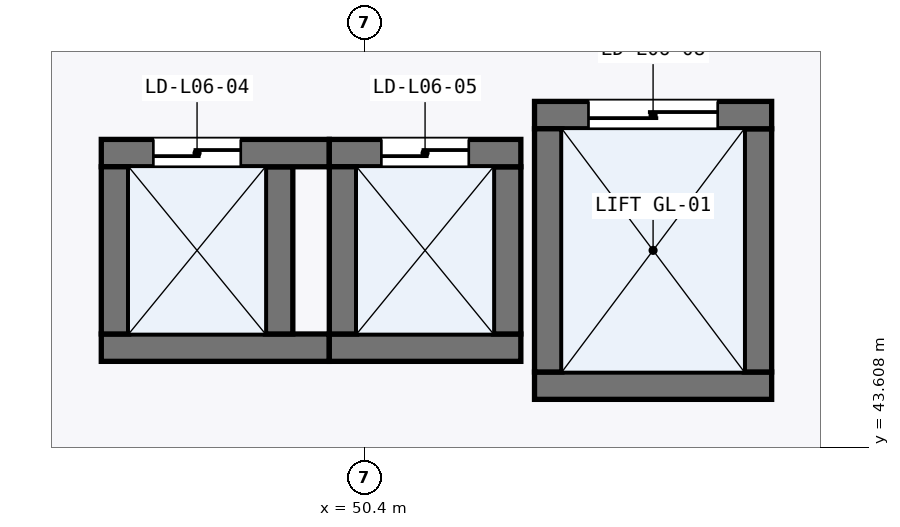
"""IFC4 building model, lengths in metres.
Left out: names, types, materials, properties, quantities, classifications, styles, units other than length and angle.
Written with IfcOpenShell. Run it as: python <this file> out.ifc"""

import sys

from ifc_helpers import new_model, si_unit, direction, frame, frame_2d, origin, place, context, subcontext, project, spatial, rectangle, extrude, element, fill, save


model = new_model("IFC4")
c1 = context("Model", 3, precision=1e-05, world=origin(), true_north=direction((0.0, 1.0)))
c2 = subcontext(c1, "Body", "Model", "MODEL_VIEW")
j1 = project(units=[si_unit("LENGTHUNIT", "METRE"), si_unit("PLANEANGLEUNIT", "RADIAN")], contexts=[c1])
p1 = place(None, origin())
s1 = spatial("IfcSite", under=j1, at=p1, CompositionType="ELEMENT")
p2 = place(p1, origin())
s2 = spatial("IfcBuilding", under=s1, at=p2, CompositionType="ELEMENT")
p3 = place(p2, frame((0.0, 0.0, 26.7)))
s3 = spatial("IfcBuildingStorey", under=s2, at=p3, CompositionType="ELEMENT", Elevation=26.7)
p4 = place(p3, frame((46.94, 44.92, 0.0), z_axis=(0.0, 0.0, 1.0), x_axis=(1.0, 0.0, 0.0)))
e1 = element("IfcWall", 1, at=p4, inside=s3, PredefinedType="SHEAR", context=c2, shape_type="SweptSolid", body=[
    extrude(rectangle(XDim=3.0, YDim=0.36, at=frame_2d((1.5, 0.0))), origin(), (0.0, 0.0, 1.0), 4.845),
])
p5 = place(p3, frame((49.28, 45.1, 0.0), z_axis=(0.0, 0.0, 1.0), x_axis=(0.0, 1.0, 0.0)))
e2 = element("IfcWall", 2, at=p5, inside=s3, PredefinedType="SHEAR", context=c2, shape_type="SweptSolid", body=[
    extrude(rectangle(XDim=2.2, YDim=0.36, at=frame_2d((1.1, 0.0))), origin(), (0.0, 0.0, 1.0), 4.845),
])
p6 = place(p3, frame((49.94, 47.48, 0.0), z_axis=(0.0, 0.0, 1.0), x_axis=(-1.0, 0.0, 0.0)))
e3 = element("IfcWall", 3, at=p6, inside=s3, PredefinedType="SHEAR", context=c2, shape_type="SweptSolid", body=[
    extrude(rectangle(XDim=3.0, YDim=0.36, at=frame_2d((1.5, 0.0))), origin(), (0.0, 0.0, 1.0), 4.845),
])
p7 = place(p6, frame((1.165, 0.0, 0.0)))
e4 = element("IfcOpeningElement", 4, at=p7, cuts=e3, PredefinedType="OPENING", context=c2, shape_type="SweptSolid", body=[
    extrude(rectangle(XDim=1.15, YDim=2.2, at=frame_2d((0.575, 1.1))), frame((0.0, 0.19, 0.0), z_axis=(0.0, -1.0, 0.0), x_axis=(1.0, 0.0, 0.0)), (0.0, 0.0, 1.0), 0.38),
])
p8 = place(p3, frame((47.12, 47.3, 0.0), z_axis=(0.0, 0.0, 1.0), x_axis=(0.0, -1.0, 0.0)))
e5 = element("IfcWall", 5, at=p8, inside=s3, PredefinedType="SHEAR", context=c2, shape_type="SweptSolid", body=[
    extrude(rectangle(XDim=2.2, YDim=0.36, at=frame_2d((1.1, 0.0))), origin(), (0.0, 0.0, 1.0), 4.845),
])
p9 = place(p3, frame((49.94, 44.92, 0.0), z_axis=(0.0, 0.0, 1.0), x_axis=(1.0, 0.0, 0.0)))
e6 = element("IfcWall", 6, at=p9, inside=s3, PredefinedType="SHEAR", context=c2, shape_type="SweptSolid", body=[
    extrude(rectangle(XDim=2.52, YDim=0.36, at=frame_2d((1.26, 0.0))), origin(), (0.0, 0.0, 1.0), 4.845),
])
p10 = place(p3, frame((52.28, 45.1, 0.0), z_axis=(0.0, 0.0, 1.0), x_axis=(0.0, 1.0, 0.0)))
e7 = element("IfcWall", 7, at=p10, inside=s3, PredefinedType="SHEAR", context=c2, shape_type="SweptSolid", body=[
    extrude(rectangle(XDim=2.2, YDim=0.36, at=frame_2d((1.1, 0.0))), origin(), (0.0, 0.0, 1.0), 4.845),
])
p11 = place(p3, frame((52.46, 47.48, 0.0), z_axis=(0.0, 0.0, 1.0), x_axis=(-1.0, 0.0, 0.0)))
e8 = element("IfcWall", 8, at=p11, inside=s3, PredefinedType="SHEAR", context=c2, shape_type="SweptSolid", body=[
    extrude(rectangle(XDim=2.52, YDim=0.36, at=frame_2d((1.26, 0.0))), origin(), (0.0, 0.0, 1.0), 4.845),
])
p12 = place(p11, frame((0.685, 0.0, 0.0)))
e9 = element("IfcOpeningElement", 9, at=p12, cuts=e8, PredefinedType="OPENING", context=c2, shape_type="SweptSolid", body=[
    extrude(rectangle(XDim=1.15, YDim=2.2, at=frame_2d((0.575, 1.1))), frame((0.0, 0.19, 0.0), z_axis=(0.0, -1.0, 0.0), x_axis=(1.0, 0.0, 0.0)), (0.0, 0.0, 1.0), 0.38),
])
p13 = place(p3, frame((50.12, 47.3, 0.0), z_axis=(0.0, 0.0, 1.0), x_axis=(0.0, -1.0, 0.0)))
e10 = element("IfcWall", 10, at=p13, inside=s3, PredefinedType="SHEAR", context=c2, shape_type="SweptSolid", body=[
    extrude(rectangle(XDim=2.2, YDim=0.36, at=frame_2d((1.1, 0.0))), origin(), (0.0, 0.0, 1.0), 4.845),
])
p14 = place(p3, frame((52.64, 44.42, 0.0), z_axis=(0.0, 0.0, 1.0), x_axis=(1.0, 0.0, 0.0)))
e11 = element("IfcWall", 11, at=p14, inside=s3, PredefinedType="SHEAR", context=c2, shape_type="SweptSolid", body=[
    extrude(rectangle(XDim=3.12, YDim=0.36, at=frame_2d((1.56, 0.0))), origin(), (0.0, 0.0, 1.0), 4.095),
])
p15 = place(p3, frame((55.58, 44.6, 0.0), z_axis=(0.0, 0.0, 1.0), x_axis=(0.0, 1.0, 0.0)))
e12 = element("IfcWall", 12, at=p15, inside=s3, PredefinedType="SHEAR", context=c2, shape_type="SweptSolid", body=[
    extrude(rectangle(XDim=3.2, YDim=0.36, at=frame_2d((1.6, 0.0))), origin(), (0.0, 0.0, 1.0), 4.095),
])
p16 = place(p3, frame((55.76, 47.98, 0.0), z_axis=(0.0, 0.0, 1.0), x_axis=(-1.0, 0.0, 0.0)))
e13 = element("IfcWall", 13, at=p16, inside=s3, PredefinedType="SHEAR", context=c2, shape_type="SweptSolid", body=[
    extrude(rectangle(XDim=3.12, YDim=0.36, at=frame_2d((1.56, 0.0))), origin(), (0.0, 0.0, 1.0), 4.095),
])
p17 = place(p16, frame((0.71, 0.0, 0.0)))
e14 = element("IfcOpeningElement", 14, at=p17, cuts=e13, PredefinedType="OPENING", context=c2, shape_type="SweptSolid", body=[
    extrude(rectangle(XDim=1.7, YDim=2.3, at=frame_2d((0.85, 1.15))), frame((0.0, 0.19, 0.0), z_axis=(0.0, -1.0, 0.0), x_axis=(1.0, 0.0, 0.0)), (0.0, 0.0, 1.0), 0.38),
])
p18 = place(p3, frame((52.82, 47.8, 0.0), z_axis=(0.0, 0.0, 1.0), x_axis=(0.0, -1.0, 0.0)))
e15 = element("IfcWall", 15, at=p18, inside=s3, PredefinedType="SHEAR", context=c2, shape_type="SweptSolid", body=[
    extrude(rectangle(XDim=3.2, YDim=0.36, at=frame_2d((1.6, 0.0))), origin(), (0.0, 0.0, 1.0), 4.095),
])
p19 = place(p7, frame((1.15, 0.0, 0.0), z_axis=(0.0, 0.0, 1.0), x_axis=(-1.0, 0.0, 0.0)))
e16 = element("IfcDoor", 16, at=p19, inside=s3, OperationType="DOUBLE_DOOR_SLIDING", PredefinedType="DOOR", context=c2, shape_type="SweptSolid", body=[
    extrude(rectangle(XDim=1.15, YDim=2.2, at=frame_2d((0.575, 1.1))), frame((0.0, 0.025, 0.0), z_axis=(0.0, -1.0, 0.0), x_axis=(1.0, 0.0, 0.0)), (0.0, 0.0, 1.0), 0.05),
])
fill(e4, e16)
p20 = place(p12, frame((1.15, 0.0, 0.0), z_axis=(0.0, 0.0, 1.0), x_axis=(-1.0, 0.0, 0.0)))
e17 = element("IfcDoor", 17, at=p20, inside=s3, OperationType="DOUBLE_DOOR_SLIDING", PredefinedType="DOOR", context=c2, shape_type="SweptSolid", body=[
    extrude(rectangle(XDim=1.15, YDim=2.2, at=frame_2d((0.575, 1.1))), frame((0.0, 0.025, 0.0), z_axis=(0.0, -1.0, 0.0), x_axis=(1.0, 0.0, 0.0)), (0.0, 0.0, 1.0), 0.05),
])
fill(e9, e17)
p21 = place(p17, frame((1.7, 0.0, 0.0), z_axis=(0.0, 0.0, 1.0), x_axis=(-1.0, 0.0, 0.0)))
e18 = element("IfcDoor", 18, at=p21, inside=s3, OperationType="DOUBLE_DOOR_SLIDING", PredefinedType="DOOR", context=c2, shape_type="SweptSolid", body=[
    extrude(rectangle(XDim=1.7, YDim=2.3, at=frame_2d((0.85, 1.15))), frame((0.0, 0.025, 0.0), z_axis=(0.0, -1.0, 0.0), x_axis=(1.0, 0.0, 0.0)), (0.0, 0.0, 1.0), 0.05),
])
fill(e14, e18)
save(model, sys.argv[1])
